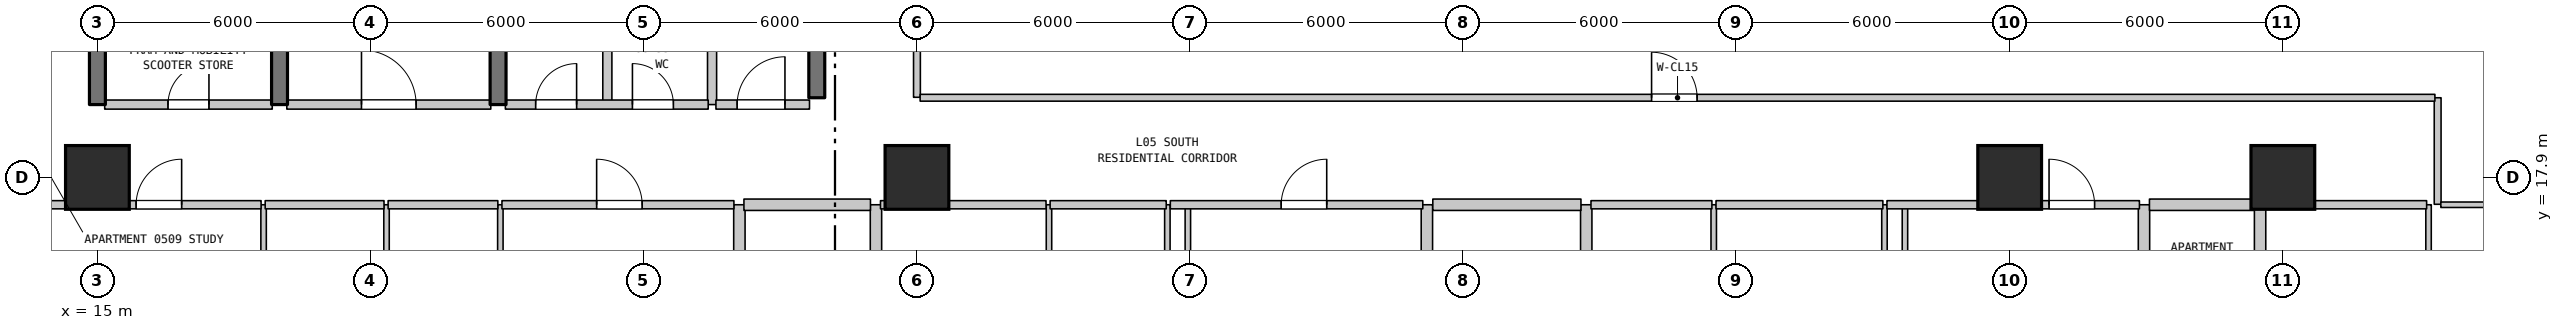
"""IFC4 building model, lengths in metres.
Left out: names, types, materials, properties, quantities, classifications, styles, units other than length and angle.
Written with IfcOpenShell. Run it as: python <this file> out.ifc"""

import sys

from ifc_helpers import new_model, si_unit, direction, frame, frame_2d, origin, origin_2d, place, context, subcontext, project, spatial, rectangle, extrude, element, fill, save


model = new_model("IFC4")
c1 = context("Model", 3, precision=1e-05, world=origin(), true_north=direction((0.0, 1.0)))
c2 = subcontext(c1, "Body", "Model", "MODEL_VIEW")
j1 = project(units=[si_unit("LENGTHUNIT", "METRE"), si_unit("PLANEANGLEUNIT", "RADIAN")], contexts=[c1])
p1 = place(None, origin())
s1 = spatial("IfcSite", under=j1, at=p1, CompositionType="ELEMENT")
p2 = place(p1, origin())
s2 = spatial("IfcBuilding", under=s1, at=p2, CompositionType="ELEMENT")
p3 = place(p2, frame((0.0, 0.0, 27.7)))
s3 = spatial("IfcBuildingStorey", under=s2, at=p3, CompositionType="ELEMENT", Elevation=27.7)
for number, where, z_axis, x_axis in (
    (1, (15.0, 17.9, 0.0), (0.0, 0.0, 1.0), (1.0, 0.0, 0.0)),
    (2, (33.0, 17.9, 0.0), (0.0, 0.0, 1.0), (1.0, 0.0, 0.0)),
    (3, (57.0, 17.9, 0.0), (0.0, 0.0, 1.0), (1.0, 0.0, 0.0)),
    (4, (63.0, 17.9, 0.0), (0.0, 0.0, 1.0), (1.0, 0.0, 0.0)),
):
    element("IfcColumn", number, at=place(p3, frame(where, z_axis=z_axis, x_axis=x_axis)), inside=s3, PredefinedType="COLUMN", context=c2, shape_type="SweptSolid", body=[
        extrude(rectangle(XDim=1.4, YDim=1.4, at=origin_2d()), origin(), (0.0, 0.0, 1.0), 3.7),
    ])
p4 = place(p3, frame((15.0, 19.5, 0.0), z_axis=(0.0, 0.0, 1.0), x_axis=(0.0, 1.0, 0.0)))
e5 = element("IfcWall", 5, at=p4, inside=s3, PredefinedType="SHEAR", context=c2, shape_type="SweptSolid", body=[
    extrude(rectangle(XDim=3.2, YDim=0.35, at=frame_2d((1.6, 0.0))), origin(), (0.0, 0.0, 1.0), 3.385),
])
p5 = place(p3, frame((18.65, 14.1, 0.0), z_axis=(0.0, 0.0, 1.0), x_axis=(0.0, 1.0, 0.0)))
e6 = element("IfcWall", 6, at=p5, inside=s3, PredefinedType="PARTITIONING", context=c2, shape_type="SweptSolid", body=[
    extrude(rectangle(XDim=3.2, YDim=0.12, at=frame_2d((1.6, 0.0))), origin(), (0.0, 0.0, 1.0), 3.385),
])
p6 = place(p5, frame((1.15, 0.0, 0.0)))
e7 = element("IfcOpeningElement", 7, at=p6, cuts=e6, PredefinedType="OPENING", context=c2, shape_type="SweptSolid", body=[
    extrude(rectangle(XDim=0.9, YDim=2.15, at=frame_2d((0.45, 1.075))), frame((0.0, 0.07, 0.0), z_axis=(0.0, -1.0, 0.0), x_axis=(1.0, 0.0, 0.0)), (0.0, 0.0, 1.0), 0.14),
])
p7 = place(p3, frame((19.0, 19.5, 0.0), z_axis=(0.0, 0.0, 1.0), x_axis=(0.0, 1.0, 0.0)))
e8 = element("IfcWall", 8, at=p7, inside=s3, PredefinedType="SHEAR", context=c2, shape_type="SweptSolid", body=[
    extrude(rectangle(XDim=3.2, YDim=0.35, at=frame_2d((1.6, 0.0))), origin(), (0.0, 0.0, 1.0), 3.385),
])
p8 = place(p3, frame((21.35, 14.1, 0.0), z_axis=(0.0, 0.0, 1.0), x_axis=(0.0, 1.0, 0.0)))
e9 = element("IfcWall", 9, at=p8, inside=s3, PredefinedType="PARTITIONING", context=c2, shape_type="SweptSolid", body=[
    extrude(rectangle(XDim=3.2, YDim=0.12, at=frame_2d((1.6, 0.0))), origin(), (0.0, 0.0, 1.0), 3.385),
])
p9 = place(p3, frame((23.8, 19.5, 0.0), z_axis=(0.0, 0.0, 1.0), x_axis=(0.0, 1.0, 0.0)))
e10 = element("IfcWall", 10, at=p9, inside=s3, PredefinedType="SHEAR", context=c2, shape_type="SweptSolid", body=[
    extrude(rectangle(XDim=3.2, YDim=0.35, at=frame_2d((1.6, 0.0))), origin(), (0.0, 0.0, 1.0), 3.385),
])
p10 = place(p3, frame((23.85, 14.85, 0.0), z_axis=(0.0, 0.0, 1.0), x_axis=(0.0, 1.0, 0.0)))
e11 = element("IfcWall", 11, at=p10, inside=s3, PredefinedType="PARTITIONING", context=c2, shape_type="SweptSolid", body=[
    extrude(rectangle(XDim=2.45, YDim=0.12, at=frame_2d((1.225, 0.0))), origin(), (0.0, 0.0, 1.0), 3.385),
])
for number, where, z_axis, x_axis in (
    (12, (26.2, 19.5, 0.0), (0.0, 0.0, 1.0), (0.0, 1.0, 0.0)),
    (13, (28.5, 19.5, 0.0), (0.0, 0.0, 1.0), (0.0, 1.0, 0.0)),
):
    element("IfcWall", number, at=place(p3, frame(where, z_axis=z_axis, x_axis=x_axis)), inside=s3, PredefinedType="STANDARD", context=c2, shape_type="SweptSolid", body=[
        extrude(rectangle(XDim=3.2, YDim=0.2, at=frame_2d((1.6, 0.0))), origin(), (0.0, 0.0, 1.0), 3.385),
    ])
p11 = place(p3, frame((29.1, 11.15, 0.0), z_axis=(0.0, 0.0, 1.0), x_axis=(0.0, 1.0, 0.0)))
e14 = element("IfcWall", 14, at=p11, inside=s3, PredefinedType="STANDARD", context=c2, shape_type="SweptSolid", body=[
    extrude(rectangle(XDim=6.15, YDim=0.25, at=frame_2d((3.075, 0.0))), origin(), (0.0, 0.0, 1.0), 3.385),
])
p12 = place(p3, frame((30.8, 19.65, 0.0), z_axis=(0.0, 0.0, 1.0), x_axis=(0.0, 1.0, 0.0)))
e15 = element("IfcWall", 15, at=p12, inside=s3, PredefinedType="SHEAR", context=c2, shape_type="SweptSolid", body=[
    extrude(rectangle(XDim=3.05, YDim=0.35, at=frame_2d((1.525, 0.0))), origin(), (0.0, 0.0, 1.0), 3.385),
])
p13 = place(p3, frame((32.1, 11.15, 0.0), z_axis=(0.0, 0.0, 1.0), x_axis=(0.0, 1.0, 0.0)))
e16 = element("IfcWall", 16, at=p13, inside=s3, PredefinedType="STANDARD", context=c2, shape_type="SweptSolid", body=[
    extrude(rectangle(XDim=6.15, YDim=0.25, at=frame_2d((3.075, 0.0))), origin(), (0.0, 0.0, 1.0), 3.385),
])
p14 = place(p3, frame((33.0, 19.66, 0.0), z_axis=(0.0, 0.0, 1.0), x_axis=(0.0, 1.0, 0.0)))
e17 = element("IfcWall", 17, at=p14, inside=s3, PredefinedType="STANDARD", context=c2, shape_type="SweptSolid", body=[
    extrude(rectangle(XDim=6.03, YDim=0.15, at=frame_2d((3.015, 0.0))), origin(), (0.0, 0.0, 1.0), 2.885),
])
for number, where, z_axis, x_axis in (
    (18, (35.9, 11.15, 0.0), (0.0, 0.0, 1.0), (0.0, 1.0, 0.0)),
    (19, (38.5, 11.15, 0.0), (0.0, 0.0, 1.0), (0.0, 1.0, 0.0)),
):
    element("IfcWall", number, at=place(p3, frame(where, z_axis=z_axis, x_axis=x_axis)), inside=s3, PredefinedType="PARTITIONING", context=c2, shape_type="SweptSolid", body=[
        extrude(rectangle(XDim=6.15, YDim=0.12, at=frame_2d((3.075, 0.0))), origin(), (0.0, 0.0, 1.0), 3.385),
    ])
p15 = place(p3, frame((38.95, 14.85, 0.0), z_axis=(0.0, 0.0, 1.0), x_axis=(0.0, 1.0, 0.0)))
e20 = element("IfcWall", 20, at=p15, inside=s3, PredefinedType="PARTITIONING", context=c2, shape_type="SweptSolid", body=[
    extrude(rectangle(XDim=2.45, YDim=0.12, at=frame_2d((1.225, 0.0))), origin(), (0.0, 0.0, 1.0), 3.385),
])
for number, where, z_axis, x_axis in (
    (21, (44.2, 11.15, 0.0), (0.0, 0.0, 1.0), (0.0, 1.0, 0.0)),
    (22, (47.7, 11.15, 0.0), (0.0, 0.0, 1.0), (0.0, 1.0, 0.0)),
):
    element("IfcWall", number, at=place(p3, frame(where, z_axis=z_axis, x_axis=x_axis)), inside=s3, PredefinedType="STANDARD", context=c2, shape_type="SweptSolid", body=[
        extrude(rectangle(XDim=6.15, YDim=0.25, at=frame_2d((3.075, 0.0))), origin(), (0.0, 0.0, 1.0), 3.385),
    ])
for number, where, z_axis, x_axis in (
    (23, (50.5, 11.15, 0.0), (0.0, 0.0, 1.0), (0.0, 1.0, 0.0)),
    (24, (54.25, 11.15, 0.0), (0.0, 0.0, 1.0), (0.0, 1.0, 0.0)),
):
    element("IfcWall", number, at=place(p3, frame(where, z_axis=z_axis, x_axis=x_axis)), inside=s3, PredefinedType="PARTITIONING", context=c2, shape_type="SweptSolid", body=[
        extrude(rectangle(XDim=6.15, YDim=0.12, at=frame_2d((3.075, 0.0))), origin(), (0.0, 0.0, 1.0), 3.385),
    ])
p16 = place(p3, frame((54.7, 14.85, 0.0), z_axis=(0.0, 0.0, 1.0), x_axis=(0.0, 1.0, 0.0)))
e25 = element("IfcWall", 25, at=p16, inside=s3, PredefinedType="PARTITIONING", context=c2, shape_type="SweptSolid", body=[
    extrude(rectangle(XDim=2.45, YDim=0.12, at=frame_2d((1.225, 0.0))), origin(), (0.0, 0.0, 1.0), 3.385),
])
for number, where, z_axis, x_axis in (
    (26, (59.95, 11.15, 0.0), (0.0, 0.0, 1.0), (0.0, 1.0, 0.0)),
    (27, (62.5, 11.15, 0.0), (0.0, 0.0, 1.0), (0.0, 1.0, 0.0)),
):
    element("IfcWall", number, at=place(p3, frame(where, z_axis=z_axis, x_axis=x_axis)), inside=s3, PredefinedType="STANDARD", context=c2, shape_type="SweptSolid", body=[
        extrude(rectangle(XDim=6.15, YDim=0.25, at=frame_2d((3.075, 0.0))), origin(), (0.0, 0.0, 1.0), 3.385),
    ])
p17 = place(p3, frame((66.2, 11.15, 0.0), z_axis=(0.0, 0.0, 1.0), x_axis=(0.0, 1.0, 0.0)))
e28 = element("IfcWall", 28, at=p17, inside=s3, PredefinedType="PARTITIONING", context=c2, shape_type="SweptSolid", body=[
    extrude(rectangle(XDim=6.15, YDim=0.12, at=frame_2d((3.075, 0.0))), origin(), (0.0, 0.0, 1.0), 3.385),
])
p18 = place(p3, frame((66.4, 17.31, 0.0), z_axis=(0.0, 0.0, 1.0), x_axis=(0.0, 1.0, 0.0)))
e29 = element("IfcWall", 29, at=p18, inside=s3, PredefinedType="STANDARD", context=c2, shape_type="SweptSolid", body=[
    extrude(rectangle(XDim=2.34, YDim=0.15, at=frame_2d((1.17, 0.0))), origin(), (0.0, 0.0, 1.0), 3.385),
])
p19 = place(p3, frame((12.875, 17.3, 0.0), z_axis=(0.0, 0.0, 1.0), x_axis=(1.0, 0.0, 0.0)))
e30 = element("IfcWall", 30, at=p19, inside=s3, PredefinedType="STANDARD", context=c2, shape_type="SweptSolid", body=[
    extrude(rectangle(XDim=5.72, YDim=0.18, at=frame_2d((2.86, 0.0))), origin(), (0.0, 0.0, 1.0), 3.385),
])
p20 = place(p19, frame((2.975, 0.0, 0.0)))
e31 = element("IfcOpeningElement", 31, at=p20, cuts=e30, PredefinedType="OPENING", context=c2, shape_type="SweptSolid", body=[
    extrude(rectangle(XDim=1.0, YDim=2.15, at=frame_2d((0.5, 1.075))), frame((0.0, 0.1, 0.0), z_axis=(0.0, -1.0, 0.0), x_axis=(1.0, 0.0, 0.0)), (0.0, 0.0, 1.0), 0.2),
])
p21 = place(p3, frame((18.685, 17.3, 0.0), z_axis=(0.0, 0.0, 1.0), x_axis=(1.0, 0.0, 0.0)))
e32 = element("IfcWall", 32, at=p21, inside=s3, PredefinedType="STANDARD", context=c2, shape_type="SweptSolid", body=[
    extrude(rectangle(XDim=2.61, YDim=0.18, at=frame_2d((1.305, 0.0))), origin(), (0.0, 0.0, 1.0), 3.385),
])
p22 = place(p3, frame((21.385, 17.3, 0.0), z_axis=(0.0, 0.0, 1.0), x_axis=(1.0, 0.0, 0.0)))
e33 = element("IfcWall", 33, at=p22, inside=s3, PredefinedType="STANDARD", context=c2, shape_type="SweptSolid", body=[
    extrude(rectangle(XDim=2.41, YDim=0.18, at=frame_2d((1.205, 0.0))), origin(), (0.0, 0.0, 1.0), 3.385),
])
p23 = place(p3, frame((23.885, 17.3, 0.0), z_axis=(0.0, 0.0, 1.0), x_axis=(1.0, 0.0, 0.0)))
e34 = element("IfcWall", 34, at=p23, inside=s3, PredefinedType="STANDARD", context=c2, shape_type="SweptSolid", body=[
    extrude(rectangle(XDim=5.095, YDim=0.18, at=frame_2d((2.547, 0.0))), origin(), (0.0, 0.0, 1.0), 3.385),
])
p24 = place(p23, frame((2.08, 0.0, 0.0)))
e35 = element("IfcOpeningElement", 35, at=p24, cuts=e34, PredefinedType="OPENING", context=c2, shape_type="SweptSolid", body=[
    extrude(rectangle(XDim=1.0, YDim=2.15, at=frame_2d((0.5, 1.075))), frame((0.0, 0.1, 0.0), z_axis=(0.0, -1.0, 0.0), x_axis=(1.0, 0.0, 0.0)), (0.0, 0.0, 1.0), 0.2),
])
p25 = place(p3, frame((29.2, 17.3, 0.0), z_axis=(0.0, 0.0, 1.0), x_axis=(1.0, 0.0, 0.0)))
e36 = element("IfcWall", 36, at=p25, inside=s3, PredefinedType="STANDARD", context=c2, shape_type="SweptSolid", body=[
    extrude(rectangle(XDim=2.779, YDim=0.25, at=frame_2d((1.39, 0.0))), origin(), (0.0, 0.0, 1.0), 3.385),
])
p26 = place(p3, frame((32.199, 17.3, 0.0), z_axis=(0.0, 0.0, 1.0), x_axis=(1.0, 0.0, 0.0)))
e37 = element("IfcWall", 37, at=p26, inside=s3, PredefinedType="STANDARD", context=c2, shape_type="SweptSolid", body=[
    extrude(rectangle(XDim=3.636, YDim=0.18, at=frame_2d((1.818, 0.0))), origin(), (0.0, 0.0, 1.0), 3.385),
])
p27 = place(p3, frame((35.925, 17.3, 0.0), z_axis=(0.0, 0.0, 1.0), x_axis=(1.0, 0.0, 0.0)))
e38 = element("IfcWall", 38, at=p27, inside=s3, PredefinedType="STANDARD", context=c2, shape_type="SweptSolid", body=[
    extrude(rectangle(XDim=2.55, YDim=0.18, at=frame_2d((1.275, 0.0))), origin(), (0.0, 0.0, 1.0), 3.385),
])
p28 = place(p3, frame((38.565, 17.3, 0.0), z_axis=(0.0, 0.0, 1.0), x_axis=(1.0, 0.0, 0.0)))
e39 = element("IfcWall", 39, at=p28, inside=s3, PredefinedType="STANDARD", context=c2, shape_type="SweptSolid", body=[
    extrude(rectangle(XDim=5.545, YDim=0.18, at=frame_2d((2.772, 0.0))), origin(), (0.0, 0.0, 1.0), 3.385),
])
p29 = place(p28, frame((2.435, 0.0, 0.0)))
e40 = element("IfcOpeningElement", 40, at=p29, cuts=e39, PredefinedType="OPENING", context=c2, shape_type="SweptSolid", body=[
    extrude(rectangle(XDim=1.0, YDim=2.15, at=frame_2d((0.5, 1.075))), frame((0.0, 0.1, 0.0), z_axis=(0.0, -1.0, 0.0), x_axis=(1.0, 0.0, 0.0)), (0.0, 0.0, 1.0), 0.2),
])
p30 = place(p3, frame((44.33, 17.3, 0.0), z_axis=(0.0, 0.0, 1.0), x_axis=(1.0, 0.0, 0.0)))
e41 = element("IfcWall", 41, at=p30, inside=s3, PredefinedType="STANDARD", context=c2, shape_type="SweptSolid", body=[
    extrude(rectangle(XDim=3.254, YDim=0.25, at=frame_2d((1.627, 0.0))), origin(), (0.0, 0.0, 1.0), 3.385),
])
p31 = place(p3, frame((47.804, 17.3, 0.0), z_axis=(0.0, 0.0, 1.0), x_axis=(1.0, 0.0, 0.0)))
e42 = element("IfcWall", 42, at=p31, inside=s3, PredefinedType="STANDARD", context=c2, shape_type="SweptSolid", body=[
    extrude(rectangle(XDim=2.656, YDim=0.18, at=frame_2d((1.328, 0.0))), origin(), (0.0, 0.0, 1.0), 3.385),
])
p32 = place(p3, frame((50.55, 17.3, 0.0), z_axis=(0.0, 0.0, 1.0), x_axis=(1.0, 0.0, 0.0)))
e43 = element("IfcWall", 43, at=p32, inside=s3, PredefinedType="STANDARD", context=c2, shape_type="SweptSolid", body=[
    extrude(rectangle(XDim=3.665, YDim=0.18, at=frame_2d((1.833, 0.0))), origin(), (0.0, 0.0, 1.0), 3.385),
])
p33 = place(p3, frame((54.305, 17.3, 0.0), z_axis=(0.0, 0.0, 1.0), x_axis=(1.0, 0.0, 0.0)))
e44 = element("IfcWall", 44, at=p33, inside=s3, PredefinedType="STANDARD", context=c2, shape_type="SweptSolid", body=[
    extrude(rectangle(XDim=5.545, YDim=0.18, at=frame_2d((2.772, 0.0))), origin(), (0.0, 0.0, 1.0), 3.385),
])
p34 = place(p33, frame((3.56, 0.0, 0.0)))
e45 = element("IfcOpeningElement", 45, at=p34, cuts=e44, PredefinedType="OPENING", context=c2, shape_type="SweptSolid", body=[
    extrude(rectangle(XDim=1.0, YDim=2.15, at=frame_2d((0.5, 1.075))), frame((0.0, 0.1, 0.0), z_axis=(0.0, -1.0, 0.0), x_axis=(1.0, 0.0, 0.0)), (0.0, 0.0, 1.0), 0.2),
])
p35 = place(p3, frame((60.07, 17.3, 0.0), z_axis=(0.0, 0.0, 1.0), x_axis=(1.0, 0.0, 0.0)))
e46 = element("IfcWall", 46, at=p35, inside=s3, PredefinedType="STANDARD", context=c2, shape_type="SweptSolid", body=[
    extrude(rectangle(XDim=2.295, YDim=0.25, at=frame_2d((1.147, 0.0))), origin(), (0.0, 0.0, 1.0), 3.385),
])
p36 = place(p3, frame((62.585, 17.3, 0.0), z_axis=(0.0, 0.0, 1.0), x_axis=(1.0, 0.0, 0.0)))
e47 = element("IfcWall", 47, at=p36, inside=s3, PredefinedType="STANDARD", context=c2, shape_type="SweptSolid", body=[
    extrude(rectangle(XDim=3.573, YDim=0.18, at=frame_2d((1.787, 0.0))), origin(), (0.0, 0.0, 1.0), 3.385),
])
p37 = place(p3, frame((66.47, 17.3, 0.0), z_axis=(0.0, 0.0, 1.0), x_axis=(1.0, 0.0, 0.0)))
e48 = element("IfcWall", 48, at=p37, inside=s3, PredefinedType="PARTITIONING", context=c2, shape_type="SweptSolid", body=[
    extrude(rectangle(XDim=2.116, YDim=0.12, at=frame_2d((1.058, 0.0))), origin(), (0.0, 0.0, 1.0), 3.385),
])
p38 = place(p3, frame((15.16, 19.5, 0.0), z_axis=(0.0, 0.0, 1.0), x_axis=(1.0, 0.0, 0.0)))
e49 = element("IfcWall", 49, at=p38, inside=s3, PredefinedType="STANDARD", context=c2, shape_type="SweptSolid", body=[
    extrude(rectangle(XDim=3.68, YDim=0.2, at=frame_2d((1.84, 0.0))), origin(), (0.0, 0.0, 1.0), 3.385),
])
p39 = place(p38, frame((1.39, 0.0, 0.0)))
e50 = element("IfcOpeningElement", 50, at=p39, cuts=e49, PredefinedType="OPENING", context=c2, shape_type="SweptSolid", body=[
    extrude(rectangle(XDim=0.9, YDim=2.15, at=frame_2d((0.45, 1.075))), frame((0.0, 0.11, 0.0), z_axis=(0.0, -1.0, 0.0), x_axis=(1.0, 0.0, 0.0)), (0.0, 0.0, 1.0), 0.22),
])
p40 = place(p3, frame((19.16, 19.5, 0.0), z_axis=(0.0, 0.0, 1.0), x_axis=(1.0, 0.0, 0.0)))
e51 = element("IfcWall", 51, at=p40, inside=s3, PredefinedType="STANDARD", context=c2, shape_type="SweptSolid", body=[
    extrude(rectangle(XDim=4.48, YDim=0.2, at=frame_2d((2.24, 0.0))), origin(), (0.0, 0.0, 1.0), 3.385),
])
p41 = place(p40, frame((1.64, 0.0, 0.0)))
e52 = element("IfcOpeningElement", 52, at=p41, cuts=e51, PredefinedType="OPENING", context=c2, shape_type="SweptSolid", body=[
    extrude(rectangle(XDim=1.2, YDim=2.2, at=frame_2d((0.6, 1.1))), frame((0.0, 0.11, 0.0), z_axis=(0.0, -1.0, 0.0), x_axis=(1.0, 0.0, 0.0)), (0.0, 0.0, 1.0), 0.22),
])
p42 = place(p3, frame((23.96, 19.5, 0.0), z_axis=(0.0, 0.0, 1.0), x_axis=(1.0, 0.0, 0.0)))
e53 = element("IfcWall", 53, at=p42, inside=s3, PredefinedType="STANDARD", context=c2, shape_type="SweptSolid", body=[
    extrude(rectangle(XDim=4.455, YDim=0.2, at=frame_2d((2.228, 0.0))), origin(), (0.0, 0.0, 1.0), 3.385),
])
p43 = place(p42, frame((0.665, 0.0, 0.0)))
e54 = element("IfcOpeningElement", 54, at=p43, cuts=e53, PredefinedType="OPENING", context=c2, shape_type="SweptSolid", body=[
    extrude(rectangle(XDim=0.9, YDim=2.15, at=frame_2d((0.45, 1.075))), frame((0.0, 0.11, 0.0), z_axis=(0.0, -1.0, 0.0), x_axis=(1.0, 0.0, 0.0)), (0.0, 0.0, 1.0), 0.22),
])
p44 = place(p42, frame((2.791, 0.0, 0.0)))
e55 = element("IfcOpeningElement", 55, at=p44, cuts=e53, PredefinedType="OPENING", context=c2, shape_type="SweptSolid", body=[
    extrude(rectangle(XDim=0.9, YDim=2.15, at=frame_2d((0.45, 1.075))), frame((0.0, 0.11, 0.0), z_axis=(0.0, -1.0, 0.0), x_axis=(1.0, 0.0, 0.0)), (0.0, 0.0, 1.0), 0.22),
])
p45 = place(p3, frame((28.585, 19.5, 0.0), z_axis=(0.0, 0.0, 1.0), x_axis=(1.0, 0.0, 0.0)))
e56 = element("IfcWall", 56, at=p45, inside=s3, PredefinedType="STANDARD", context=c2, shape_type="SweptSolid", body=[
    extrude(rectangle(XDim=2.055, YDim=0.2, at=frame_2d((1.027, 0.0))), origin(), (0.0, 0.0, 1.0), 3.385),
])
p46 = place(p45, frame((0.466, 0.0, 0.0)))
e57 = element("IfcOpeningElement", 57, at=p46, cuts=e56, PredefinedType="OPENING", context=c2, shape_type="SweptSolid", body=[
    extrude(rectangle(XDim=1.05, YDim=2.15, at=frame_2d((0.525, 1.075))), frame((0.0, 0.11, 0.0), z_axis=(0.0, -1.0, 0.0), x_axis=(1.0, 0.0, 0.0)), (0.0, 0.0, 1.0), 0.22),
])
p47 = place(p3, frame((33.07, 19.65, 0.0), z_axis=(0.0, 0.0, 1.0), x_axis=(1.0, 0.0, 0.0)))
e58 = element("IfcWall", 58, at=p47, inside=s3, PredefinedType="STANDARD", context=c2, shape_type="SweptSolid", body=[
    extrude(rectangle(XDim=33.27, YDim=0.15, at=frame_2d((16.635, 0.0))), origin(), (0.0, 0.0, 1.0), 3.385),
])
p48 = place(p47, frame((16.065, 0.0, 0.0)))
e59 = element("IfcOpeningElement", 59, at=p48, cuts=e58, PredefinedType="OPENING", context=c2, shape_type="SweptSolid", body=[
    extrude(rectangle(XDim=1.0, YDim=2.15, at=frame_2d((0.5, 1.075))), frame((0.0, 0.085, 0.0), z_axis=(0.0, -1.0, 0.0), x_axis=(1.0, 0.0, 0.0)), (0.0, 0.0, 1.0), 0.17),
])
p49 = place(p20, origin())
e60 = element("IfcDoor", 60, at=p49, inside=s3, OperationType="SINGLE_SWING_RIGHT", PredefinedType="DOOR", context=c2, shape_type="SweptSolid", body=[
    extrude(rectangle(XDim=1.0, YDim=2.15, at=frame_2d((0.5, 1.075))), frame((0.0, 0.025, 0.0), z_axis=(0.0, -1.0, 0.0), x_axis=(1.0, 0.0, 0.0)), (0.0, 0.0, 1.0), 0.05),
])
fill(e31, e60)
p50 = place(p24, origin())
e61 = element("IfcDoor", 61, at=p50, inside=s3, OperationType="SINGLE_SWING_LEFT", PredefinedType="DOOR", context=c2, shape_type="SweptSolid", body=[
    extrude(rectangle(XDim=1.0, YDim=2.15, at=frame_2d((0.5, 1.075))), frame((0.0, 0.025, 0.0), z_axis=(0.0, -1.0, 0.0), x_axis=(1.0, 0.0, 0.0)), (0.0, 0.0, 1.0), 0.05),
])
fill(e35, e61)
p51 = place(p29, origin())
e62 = element("IfcDoor", 62, at=p51, inside=s3, OperationType="SINGLE_SWING_RIGHT", PredefinedType="DOOR", context=c2, shape_type="SweptSolid", body=[
    extrude(rectangle(XDim=1.0, YDim=2.15, at=frame_2d((0.5, 1.075))), frame((0.0, 0.025, 0.0), z_axis=(0.0, -1.0, 0.0), x_axis=(1.0, 0.0, 0.0)), (0.0, 0.0, 1.0), 0.05),
])
fill(e40, e62)
p52 = place(p34, origin())
e63 = element("IfcDoor", 63, at=p52, inside=s3, OperationType="SINGLE_SWING_LEFT", PredefinedType="DOOR", context=c2, shape_type="SweptSolid", body=[
    extrude(rectangle(XDim=1.0, YDim=2.15, at=frame_2d((0.5, 1.075))), frame((0.0, 0.025, 0.0), z_axis=(0.0, -1.0, 0.0), x_axis=(1.0, 0.0, 0.0)), (0.0, 0.0, 1.0), 0.05),
])
fill(e45, e63)
p53 = place(p39, origin())
e64 = element("IfcDoor", 64, at=p53, inside=s3, OperationType="SINGLE_SWING_RIGHT", PredefinedType="DOOR", context=c2, shape_type="SweptSolid", body=[
    extrude(rectangle(XDim=0.9, YDim=2.15, at=frame_2d((0.45, 1.075))), frame((0.0, 0.025, 0.0), z_axis=(0.0, -1.0, 0.0), x_axis=(1.0, 0.0, 0.0)), (0.0, 0.0, 1.0), 0.05),
])
fill(e50, e64)
p54 = place(p41, origin())
e65 = element("IfcDoor", 65, at=p54, inside=s3, OperationType="SINGLE_SWING_LEFT", PredefinedType="DOOR", context=c2, shape_type="SweptSolid", body=[
    extrude(rectangle(XDim=1.2, YDim=2.2, at=frame_2d((0.6, 1.1))), frame((0.0, 0.025, 0.0), z_axis=(0.0, -1.0, 0.0), x_axis=(1.0, 0.0, 0.0)), (0.0, 0.0, 1.0), 0.05),
])
fill(e52, e65)
p55 = place(p43, origin())
e66 = element("IfcDoor", 66, at=p55, inside=s3, OperationType="SINGLE_SWING_RIGHT", PredefinedType="DOOR", context=c2, shape_type="SweptSolid", body=[
    extrude(rectangle(XDim=0.9, YDim=2.15, at=frame_2d((0.45, 1.075))), frame((0.0, 0.025, 0.0), z_axis=(0.0, -1.0, 0.0), x_axis=(1.0, 0.0, 0.0)), (0.0, 0.0, 1.0), 0.05),
])
fill(e54, e66)
p56 = place(p44, origin())
e67 = element("IfcDoor", 67, at=p56, inside=s3, OperationType="SINGLE_SWING_LEFT", PredefinedType="DOOR", context=c2, shape_type="SweptSolid", body=[
    extrude(rectangle(XDim=0.9, YDim=2.15, at=frame_2d((0.45, 1.075))), frame((0.0, 0.025, 0.0), z_axis=(0.0, -1.0, 0.0), x_axis=(1.0, 0.0, 0.0)), (0.0, 0.0, 1.0), 0.05),
])
fill(e55, e67)
p57 = place(p46, origin())
e68 = element("IfcDoor", 68, at=p57, inside=s3, OperationType="SINGLE_SWING_RIGHT", PredefinedType="DOOR", context=c2, shape_type="SweptSolid", body=[
    extrude(rectangle(XDim=1.05, YDim=2.15, at=frame_2d((0.525, 1.075))), frame((0.0, 0.025, 0.0), z_axis=(0.0, -1.0, 0.0), x_axis=(1.0, 0.0, 0.0)), (0.0, 0.0, 1.0), 0.05),
])
fill(e57, e68)
p58 = place(p48, origin())
e69 = element("IfcDoor", 69, at=p58, inside=s3, OperationType="SINGLE_SWING_LEFT", PredefinedType="DOOR", context=c2, shape_type="SweptSolid", body=[
    extrude(rectangle(XDim=1.0, YDim=2.15, at=frame_2d((0.5, 1.075))), frame((0.0, 0.025, 0.0), z_axis=(0.0, -1.0, 0.0), x_axis=(1.0, 0.0, 0.0)), (0.0, 0.0, 1.0), 0.05),
])
fill(e59, e69)
save(model, sys.argv[1])
